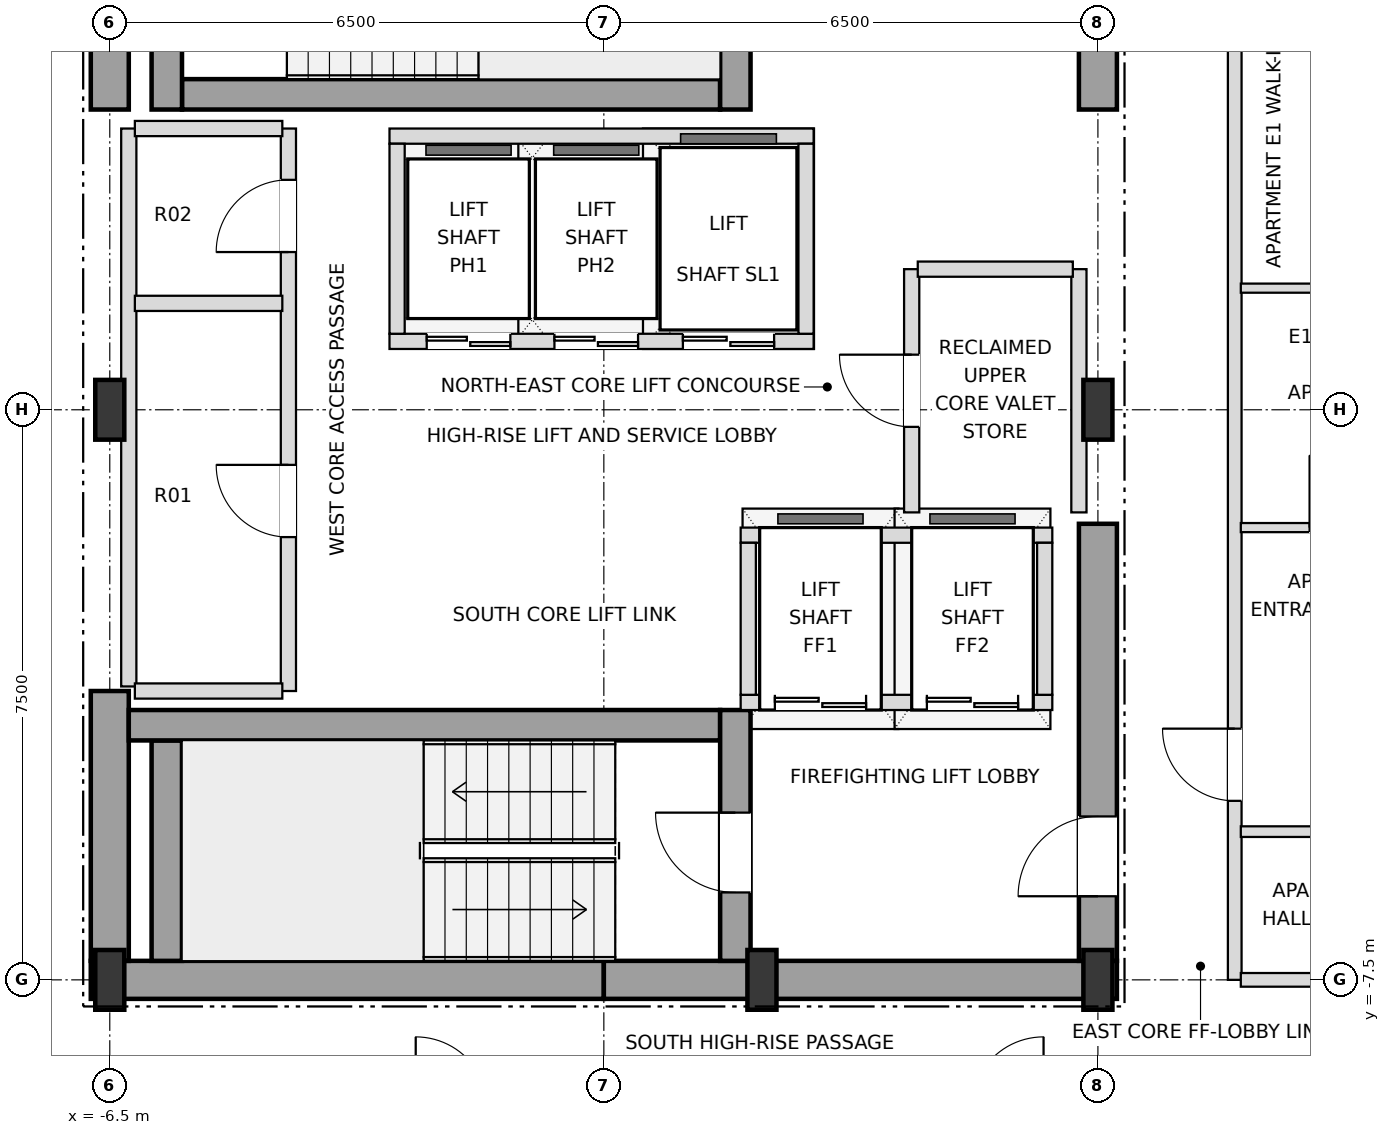
"""IFC4 building model, lengths in metres.
Left out: names, types, materials, properties, quantities, classifications, styles, units other than length and angle.
Written with IfcOpenShell. Run it as: python <this file> out.ifc"""

import sys

from ifc_helpers import new_model, si_unit, direction, frame, frame_2d, origin, origin_2d, place, context, subcontext, project, spatial, rectangle, i_section, extrude, element, fill, save


model = new_model("IFC4")
c1 = context("Model", 3, precision=1e-05, world=origin(), true_north=direction((0.0, 1.0)))
c2 = subcontext(c1, "Body", "Model", "MODEL_VIEW")
j1 = project(units=[si_unit("LENGTHUNIT", "METRE"), si_unit("PLANEANGLEUNIT", "RADIAN")], contexts=[c1])
p1 = place(None, origin())
s1 = spatial("IfcSite", under=j1, at=p1, CompositionType="ELEMENT")
p2 = place(p1, origin())
s2 = spatial("IfcBuilding", under=s1, at=p2, CompositionType="ELEMENT")
p3 = place(p2, frame((0.0, 0.0, 236.7)))
s3 = spatial("IfcBuildingStorey", under=s2, at=p3, CompositionType="ELEMENT", Elevation=236.7)
for number, where, z_axis, x_axis in (
    (1, (-6.5, -7.5, 0.0), (0.0, 0.0, 1.0), (1.0, 0.0, 0.0)),
    (2, (2.08, -7.5, 0.0), (0.0, 0.0, 1.0), (1.0, 0.0, 0.0)),
    (3, (6.5, -7.5, 0.0), (0.0, 0.0, 1.0), (1.0, 0.0, 0.0)),
    (4, (-6.5, 0.0, 0.0), (0.0, 0.0, 1.0), (1.0, 0.0, 0.0)),
    (5, (6.5, 0.0, 0.0), (0.0, 0.0, 1.0), (1.0, 0.0, 0.0)),
):
    element("IfcColumn", number, at=place(p3, frame(where, z_axis=z_axis, x_axis=x_axis)), inside=s3, PredefinedType="COLUMN", context=c2, shape_type="SweptSolid", body=[
        extrude(i_section(OverallWidth=0.382, OverallDepth=0.786, WebThickness=0.02, FlangeThickness=0.033, at=origin_2d()), origin(), (0.0, 0.0, 1.0), 3.6),
    ])
for number, where, z_axis, x_axis in (
    (6, (-6.75, -7.5, 0.0), (0.0, 0.0, 1.0), (1.0, 0.0, 0.0)),
    (7, (0.0, -7.5, 0.0), (0.0, 0.0, 1.0), (1.0, 0.0, 0.0)),
):
    element("IfcWall", number, at=place(p3, frame(where, z_axis=z_axis, x_axis=x_axis)), inside=s3, PredefinedType="SHEAR", context=c2, shape_type="SweptSolid", body=[
        extrude(rectangle(XDim=6.75, YDim=0.5, at=frame_2d((3.375, 0.0))), origin(), (0.0, 0.0, 1.0), 3.38),
    ])
p4 = place(p3, frame((-6.5, -7.25, 0.0), z_axis=(0.0, 0.0, 1.0), x_axis=(0.0, 1.0, 0.0)))
e8 = element("IfcWall", 8, at=p4, inside=s3, PredefinedType="SHEAR", context=c2, shape_type="SweptSolid", body=[
    extrude(rectangle(XDim=3.55, YDim=0.5, at=frame_2d((1.775, 0.0))), origin(), (0.0, 0.0, 1.0), 3.38),
])
p5 = place(p3, frame((-6.5, 3.95, 0.0), z_axis=(0.0, 0.0, 1.0), x_axis=(0.0, 1.0, 0.0)))
e9 = element("IfcWall", 9, at=p5, inside=s3, PredefinedType="SHEAR", context=c2, shape_type="SweptSolid", body=[
    extrude(rectangle(XDim=3.3, YDim=0.5, at=frame_2d((1.65, 0.0))), origin(), (0.0, 0.0, 1.0), 3.38),
])
p6 = place(p3, frame((6.5, -7.25, 0.0), z_axis=(0.0, 0.0, 1.0), x_axis=(0.0, 1.0, 0.0)))
e10 = element("IfcWall", 10, at=p6, inside=s3, PredefinedType="SHEAR", context=c2, shape_type="SweptSolid", body=[
    extrude(rectangle(XDim=5.75, YDim=0.5, at=frame_2d((2.875, 0.0))), origin(), (0.0, 0.0, 1.0), 3.38),
])
p7 = place(p6, frame((0.85, 0.0, 0.0)))
e11 = element("IfcOpeningElement", 11, at=p7, cuts=e10, PredefinedType="OPENING", context=c2, shape_type="SweptSolid", body=[
    extrude(rectangle(XDim=1.05, YDim=2.15, at=frame_2d((0.525, 1.075))), frame((0.0, 0.26, 0.0), z_axis=(0.0, -1.0, 0.0), x_axis=(1.0, 0.0, 0.0)), (0.0, 0.0, 1.0), 0.52),
])
p8 = place(p3, frame((6.5, 3.95, 0.0), z_axis=(0.0, 0.0, 1.0), x_axis=(0.0, 1.0, 0.0)))
e12 = element("IfcWall", 12, at=p8, inside=s3, PredefinedType="SHEAR", context=c2, shape_type="SweptSolid", body=[
    extrude(rectangle(XDim=3.3, YDim=0.5, at=frame_2d((1.65, 0.0))), origin(), (0.0, 0.0, 1.0), 3.38),
])
p9 = place(p3, frame((-5.75, -7.25, 0.0), z_axis=(0.0, 0.0, 1.0), x_axis=(0.0, 1.0, 0.0)))
e13 = element("IfcWall", 13, at=p9, inside=s3, PredefinedType="SHEAR", context=c2, shape_type="SweptSolid", body=[
    extrude(rectangle(XDim=2.9, YDim=0.4, at=frame_2d((1.45, 0.0))), origin(), (0.0, 0.0, 1.0), 3.38),
])
p10 = place(p3, frame((-6.25, -4.15, 0.0), z_axis=(0.0, 0.0, 1.0), x_axis=(1.0, 0.0, 0.0)))
e14 = element("IfcWall", 14, at=p10, inside=s3, PredefinedType="SHEAR", context=c2, shape_type="SweptSolid", body=[
    extrude(rectangle(XDim=7.78, YDim=0.4, at=frame_2d((3.89, 0.0))), origin(), (0.0, 0.0, 1.0), 3.38),
])
p11 = place(p3, frame((1.73, -7.25, 0.0), z_axis=(0.0, 0.0, 1.0), x_axis=(0.0, 1.0, 0.0)))
e15 = element("IfcWall", 15, at=p11, inside=s3, PredefinedType="SHEAR", context=c2, shape_type="SweptSolid", body=[
    extrude(rectangle(XDim=3.3, YDim=0.4, at=frame_2d((1.65, 0.0))), origin(), (0.0, 0.0, 1.0), 3.38),
])
p12 = place(p11, frame((0.9, 0.0, 0.0)))
e16 = element("IfcOpeningElement", 16, at=p12, cuts=e15, PredefinedType="OPENING", context=c2, shape_type="SweptSolid", body=[
    extrude(rectangle(XDim=1.05, YDim=2.15, at=frame_2d((0.525, 1.075))), frame((0.0, 0.21, 0.0), z_axis=(0.0, -1.0, 0.0), x_axis=(1.0, 0.0, 0.0)), (0.0, 0.0, 1.0), 0.42),
])
p13 = place(p3, frame((-5.55, 4.15, 0.0), z_axis=(0.0, 0.0, 1.0), x_axis=(1.0, 0.0, 0.0)))
e17 = element("IfcWall", 17, at=p13, inside=s3, PredefinedType="SHEAR", context=c2, shape_type="SweptSolid", body=[
    extrude(rectangle(XDim=7.08, YDim=0.4, at=frame_2d((3.54, 0.0))), origin(), (0.0, 0.0, 1.0), 3.38),
])
for number, where, z_axis, x_axis in (
    (18, (1.73, 3.95, 0.0), (0.0, 0.0, 1.0), (0.0, 1.0, 0.0)),
    (19, (-5.75, 3.95, 0.0), (0.0, 0.0, 1.0), (0.0, 1.0, 0.0)),
):
    element("IfcWall", number, at=place(p3, frame(where, z_axis=z_axis, x_axis=x_axis)), inside=s3, PredefinedType="SHEAR", context=c2, shape_type="SweptSolid", body=[
        extrude(rectangle(XDim=3.3, YDim=0.4, at=frame_2d((1.65, 0.0))), origin(), (0.0, 0.0, 1.0), 3.38),
    ])
p14 = place(p3, frame((-2.82, 0.9, 0.0), z_axis=(0.0, 0.0, 1.0), x_axis=(1.0, 0.0, 0.0)))
e20 = element("IfcWall", 20, at=p14, inside=s3, PredefinedType="SOLIDWALL", context=c2, shape_type="SweptSolid", body=[
    extrude(rectangle(XDim=5.58, YDim=0.2, at=frame_2d((2.79, 0.0))), origin(), (0.0, 0.0, 1.0), 3.38),
])
p15 = place(p14, frame((0.49, 0.0, 0.0)))
e21 = element("IfcOpeningElement", 21, at=p15, cuts=e20, PredefinedType="OPENING", context=c2, shape_type="SweptSolid", body=[
    extrude(rectangle(XDim=1.1, YDim=2.15, at=frame_2d((0.55, 1.075))), frame((0.0, 0.11, 0.0), z_axis=(0.0, -1.0, 0.0), x_axis=(1.0, 0.0, 0.0)), (0.0, 0.0, 1.0), 0.22),
])
p16 = place(p14, frame((2.17, 0.0, 0.0)))
e22 = element("IfcOpeningElement", 22, at=p16, cuts=e20, PredefinedType="OPENING", context=c2, shape_type="SweptSolid", body=[
    extrude(rectangle(XDim=1.1, YDim=2.15, at=frame_2d((0.55, 1.075))), frame((0.0, 0.11, 0.0), z_axis=(0.0, -1.0, 0.0), x_axis=(1.0, 0.0, 0.0)), (0.0, 0.0, 1.0), 0.22),
])
p17 = place(p14, frame((3.86, 0.0, 0.0)))
e23 = element("IfcOpeningElement", 23, at=p17, cuts=e20, PredefinedType="OPENING", context=c2, shape_type="SweptSolid", body=[
    extrude(rectangle(XDim=1.2, YDim=2.2, at=frame_2d((0.6, 1.1))), frame((0.0, 0.11, 0.0), z_axis=(0.0, -1.0, 0.0), x_axis=(1.0, 0.0, 0.0)), (0.0, 0.0, 1.0), 0.22),
])
p18 = place(p3, frame((-2.82, 3.6, 0.0), z_axis=(0.0, 0.0, 1.0), x_axis=(1.0, 0.0, 0.0)))
e24 = element("IfcWall", 24, at=p18, inside=s3, PredefinedType="SOLIDWALL", context=c2, shape_type="SweptSolid", body=[
    extrude(rectangle(XDim=5.58, YDim=0.2, at=frame_2d((2.79, 0.0))), origin(), (0.0, 0.0, 1.0), 3.38),
])
for number, where, z_axis, x_axis in (
    (25, (-2.72, 1.0, 0.0), (0.0, 0.0, 1.0), (0.0, 1.0, 0.0)),
    (26, (2.66, 1.0, 0.0), (0.0, 0.0, 1.0), (0.0, 1.0, 0.0)),
):
    element("IfcWall", number, at=place(p3, frame(where, z_axis=z_axis, x_axis=x_axis)), inside=s3, PredefinedType="SOLIDWALL", context=c2, shape_type="SweptSolid", body=[
        extrude(rectangle(XDim=2.5, YDim=0.2, at=frame_2d((1.25, 0.0))), origin(), (0.0, 0.0, 1.0), 3.38),
    ])
p19 = place(p3, frame((1.8, -3.85, 0.0), z_axis=(0.0, 0.0, 1.0), x_axis=(1.0, 0.0, 0.0)))
e27 = element("IfcWall", 27, at=p19, inside=s3, PredefinedType="SOLIDWALL", context=c2, shape_type="SweptSolid", body=[
    extrude(rectangle(XDim=4.1, YDim=0.2, at=frame_2d((2.05, 0.0))), origin(), (0.0, 0.0, 1.0), 3.38),
])
p20 = place(p19, frame((0.45, 0.0, 0.0)))
e28 = element("IfcOpeningElement", 28, at=p20, cuts=e27, PredefinedType="OPENING", context=c2, shape_type="SweptSolid", body=[
    extrude(rectangle(XDim=1.2, YDim=2.2, at=frame_2d((0.6, 1.1))), frame((0.0, 0.11, 0.0), z_axis=(0.0, -1.0, 0.0), x_axis=(1.0, 0.0, 0.0)), (0.0, 0.0, 1.0), 0.22),
])
p21 = place(p19, frame((2.45, 0.0, 0.0)))
e29 = element("IfcOpeningElement", 29, at=p21, cuts=e27, PredefinedType="OPENING", context=c2, shape_type="SweptSolid", body=[
    extrude(rectangle(XDim=1.2, YDim=2.2, at=frame_2d((0.6, 1.1))), frame((0.0, 0.11, 0.0), z_axis=(0.0, -1.0, 0.0), x_axis=(1.0, 0.0, 0.0)), (0.0, 0.0, 1.0), 0.22),
])
p22 = place(p3, frame((1.8, -1.65, 0.0), z_axis=(0.0, 0.0, 1.0), x_axis=(1.0, 0.0, 0.0)))
e30 = element("IfcWall", 30, at=p22, inside=s3, PredefinedType="SOLIDWALL", context=c2, shape_type="SweptSolid", body=[
    extrude(rectangle(XDim=4.1, YDim=0.2, at=frame_2d((2.05, 0.0))), origin(), (0.0, 0.0, 1.0), 3.38),
])
for number, where, z_axis, x_axis in (
    (31, (1.9, -3.75, 0.0), (0.0, 0.0, 1.0), (0.0, 1.0, 0.0)),
    (32, (5.8, -3.75, 0.0), (0.0, 0.0, 1.0), (0.0, 1.0, 0.0)),
):
    element("IfcWall", number, at=place(p3, frame(where, z_axis=z_axis, x_axis=x_axis)), inside=s3, PredefinedType="SOLIDWALL", context=c2, shape_type="SweptSolid", body=[
        extrude(rectangle(XDim=2.0, YDim=0.2, at=frame_2d((1.0, 0.0))), origin(), (0.0, 0.0, 1.0), 3.38),
    ])
p23 = place(p3, frame((-6.25, -3.64, 0.0), z_axis=(0.0, 0.0, 1.0), x_axis=(0.0, 1.0, 0.0)))
e33 = element("IfcWall", 33, at=p23, inside=s3, PredefinedType="SOLIDWALL", context=c2, shape_type="SweptSolid", body=[
    extrude(rectangle(XDim=7.34, YDim=0.2, at=frame_2d((3.67, 0.0))), origin(), (0.0, 0.0, 1.0), 3.38),
])
p24 = place(p3, frame((-4.15, -3.7, 0.0), z_axis=(0.0, 0.0, 1.0), x_axis=(0.0, 1.0, 0.0)))
e34 = element("IfcWall", 34, at=p24, inside=s3, PredefinedType="SOLIDWALL", context=c2, shape_type="SweptSolid", body=[
    extrude(rectangle(XDim=7.4, YDim=0.2, at=frame_2d((3.7, 0.0))), origin(), (0.0, 0.0, 1.0), 3.38),
])
p25 = place(p24, frame((2.025, 0.0, 0.0)))
e35 = element("IfcOpeningElement", 35, at=p25, cuts=e34, PredefinedType="OPENING", context=c2, shape_type="SweptSolid", body=[
    extrude(rectangle(XDim=0.95, YDim=2.15, at=frame_2d((0.475, 1.075))), frame((0.0, 0.11, 0.0), z_axis=(0.0, -1.0, 0.0), x_axis=(1.0, 0.0, 0.0)), (0.0, 0.0, 1.0), 0.22),
])
p26 = place(p24, frame((5.775, 0.0, 0.0)))
e36 = element("IfcOpeningElement", 36, at=p26, cuts=e34, PredefinedType="OPENING", context=c2, shape_type="SweptSolid", body=[
    extrude(rectangle(XDim=0.95, YDim=2.15, at=frame_2d((0.475, 1.075))), frame((0.0, 0.11, 0.0), z_axis=(0.0, -1.0, 0.0), x_axis=(1.0, 0.0, 0.0)), (0.0, 0.0, 1.0), 0.22),
])
p27 = place(p3, frame((4.05, -1.35, 0.0), z_axis=(0.0, 0.0, 1.0), x_axis=(0.0, 1.0, 0.0)))
e37 = element("IfcWall", 37, at=p27, inside=s3, PredefinedType="SOLIDWALL", context=c2, shape_type="SweptSolid", body=[
    extrude(rectangle(XDim=3.2, YDim=0.2, at=frame_2d((1.6, 0.0))), origin(), (0.0, 0.0, 1.0), 3.38),
])
p28 = place(p27, frame((1.125, 0.0, 0.0)))
e38 = element("IfcOpeningElement", 38, at=p28, cuts=e37, PredefinedType="OPENING", context=c2, shape_type="SweptSolid", body=[
    extrude(rectangle(XDim=0.95, YDim=2.15, at=frame_2d((0.475, 1.075))), frame((0.0, 0.11, 0.0), z_axis=(0.0, -1.0, 0.0), x_axis=(1.0, 0.0, 0.0)), (0.0, 0.0, 1.0), 0.22),
])
p29 = place(p3, frame((6.25, -1.35, 0.0), z_axis=(0.0, 0.0, 1.0), x_axis=(0.0, 1.0, 0.0)))
e39 = element("IfcWall", 39, at=p29, inside=s3, PredefinedType="SOLIDWALL", context=c2, shape_type="SweptSolid", body=[
    extrude(rectangle(XDim=3.2, YDim=0.2, at=frame_2d((1.6, 0.0))), origin(), (0.0, 0.0, 1.0), 3.38),
])
p30 = place(p3, frame((8.3, -7.5, 0.0), z_axis=(0.0, 0.0, 1.0), x_axis=(0.0, 1.0, 0.0)))
e40 = element("IfcWall", 40, at=p30, inside=s3, PredefinedType="PARTITIONING", context=c2, shape_type="SweptSolid", body=[
    extrude(rectangle(XDim=15.0, YDim=0.18, at=frame_2d((7.5, 0.0))), origin(), (0.0, 0.0, 1.0), 3.38),
])
p31 = place(p30, frame((2.355, 0.0, 0.0)))
e41 = element("IfcOpeningElement", 41, at=p31, cuts=e40, PredefinedType="OPENING", context=c2, shape_type="SweptSolid", body=[
    extrude(rectangle(XDim=0.95, YDim=2.15, at=frame_2d((0.475, 1.075))), frame((0.0, 0.1, 0.0), z_axis=(0.0, -1.0, 0.0), x_axis=(1.0, 0.0, 0.0)), (0.0, 0.0, 1.0), 0.2),
])
p32 = place(p3, frame((8.38, -7.5, 0.0), z_axis=(0.0, 0.0, 1.0), x_axis=(1.0, 0.0, 0.0)))
e42 = element("IfcWall", 42, at=p32, inside=s3, PredefinedType="PARTITIONING", context=c2, shape_type="SweptSolid", body=[
    extrude(rectangle(XDim=2.74, YDim=0.18, at=frame_2d((1.37, 0.0))), origin(), (0.0, 0.0, 1.0), 2.826),
])
p33 = place(p3, frame((8.38, -5.55, 0.0), z_axis=(0.0, 0.0, 1.0), x_axis=(1.0, 0.0, 0.0)))
e43 = element("IfcWall", 43, at=p33, inside=s3, PredefinedType="PARTITIONING", context=c2, shape_type="SweptSolid", body=[
    extrude(rectangle(XDim=2.74, YDim=0.14, at=frame_2d((1.37, 0.0))), origin(), (0.0, 0.0, 1.0), 3.38),
])
p34 = place(p33, frame((0.93, 0.0, 0.0)))
e44 = element("IfcOpeningElement", 44, at=p34, cuts=e43, PredefinedType="OPENING", context=c2, shape_type="SweptSolid", body=[
    extrude(rectangle(XDim=0.9, YDim=2.1, at=frame_2d((0.45, 1.05))), frame((0.0, 0.08, 0.0), z_axis=(0.0, -1.0, 0.0), x_axis=(1.0, 0.0, 0.0)), (0.0, 0.0, 1.0), 0.16),
])
p35 = place(p3, frame((-6.17, -3.7, 0.0), z_axis=(0.0, 0.0, 1.0), x_axis=(1.0, 0.0, 0.0)))
e45 = element("IfcWall", 45, at=p35, inside=s3, PredefinedType="SOLIDWALL", context=c2, shape_type="SweptSolid", body=[
    extrude(rectangle(XDim=1.94, YDim=0.2, at=frame_2d((0.97, 0.0))), origin(), (0.0, 0.0, 1.0), 3.38),
])
p36 = place(p3, frame((8.38, -1.55, 0.0), z_axis=(0.0, 0.0, 1.0), x_axis=(1.0, 0.0, 0.0)))
e46 = element("IfcWall", 46, at=p36, inside=s3, PredefinedType="PARTITIONING", context=c2, shape_type="SweptSolid", body=[
    extrude(rectangle(XDim=2.74, YDim=0.12, at=frame_2d((1.37, 0.0))), origin(), (0.0, 0.0, 1.0), 3.38),
])
p37 = place(p36, frame((0.905, 0.0, 0.0)))
e47 = element("IfcOpeningElement", 47, at=p37, cuts=e46, PredefinedType="OPENING", context=c2, shape_type="SweptSolid", body=[
    extrude(rectangle(XDim=0.95, YDim=2.1, at=frame_2d((0.475, 1.05))), frame((0.0, 0.07, 0.0), z_axis=(0.0, -1.0, 0.0), x_axis=(1.0, 0.0, 0.0)), (0.0, 0.0, 1.0), 0.14),
])
p38 = place(p3, frame((-6.17, 1.4, 0.0), z_axis=(0.0, 0.0, 1.0), x_axis=(1.0, 0.0, 0.0)))
e48 = element("IfcWall", 48, at=p38, inside=s3, PredefinedType="SOLIDWALL", context=c2, shape_type="SweptSolid", body=[
    extrude(rectangle(XDim=1.94, YDim=0.2, at=frame_2d((0.97, 0.0))), origin(), (0.0, 0.0, 1.0), 3.38),
])
p39 = place(p3, frame((8.38, 1.6, 0.0), z_axis=(0.0, 0.0, 1.0), x_axis=(1.0, 0.0, 0.0)))
e49 = element("IfcWall", 49, at=p39, inside=s3, PredefinedType="PARTITIONING", context=c2, shape_type="SweptSolid", body=[
    extrude(rectangle(XDim=2.74, YDim=0.12, at=frame_2d((1.37, 0.0))), origin(), (0.0, 0.0, 1.0), 3.38),
])
p40 = place(p39, frame((0.93, 0.0, 0.0)))
e50 = element("IfcOpeningElement", 50, at=p40, cuts=e49, PredefinedType="OPENING", context=c2, shape_type="SweptSolid", body=[
    extrude(rectangle(XDim=0.9, YDim=2.1, at=frame_2d((0.45, 1.05))), frame((0.0, 0.07, 0.0), z_axis=(0.0, -1.0, 0.0), x_axis=(1.0, 0.0, 0.0)), (0.0, 0.0, 1.0), 0.14),
])
p41 = place(p3, frame((4.13, 1.85, 0.0), z_axis=(0.0, 0.0, 1.0), x_axis=(1.0, 0.0, 0.0)))
e51 = element("IfcWall", 51, at=p41, inside=s3, PredefinedType="SOLIDWALL", context=c2, shape_type="SweptSolid", body=[
    extrude(rectangle(XDim=2.04, YDim=0.2, at=frame_2d((1.02, 0.0))), origin(), (0.0, 0.0, 1.0), 3.38),
])
p42 = place(p3, frame((-6.17, 3.7, 0.0), z_axis=(0.0, 0.0, 1.0), x_axis=(1.0, 0.0, 0.0)))
e52 = element("IfcWall", 52, at=p42, inside=s3, PredefinedType="SOLIDWALL", context=c2, shape_type="SweptSolid", body=[
    extrude(rectangle(XDim=1.94, YDim=0.2, at=frame_2d((0.97, 0.0))), origin(), (0.0, 0.0, 1.0), 3.38),
])
p43 = place(p7, origin())
e53 = element("IfcDoor", 53, at=p43, inside=s3, OperationType="SINGLE_SWING_LEFT", PredefinedType="DOOR", context=c2, shape_type="SweptSolid", body=[
    extrude(rectangle(XDim=1.05, YDim=2.15, at=frame_2d((0.525, 1.075))), frame((0.0, 0.025, 0.0), z_axis=(0.0, -1.0, 0.0), x_axis=(1.0, 0.0, 0.0)), (0.0, 0.0, 1.0), 0.05),
])
fill(e11, e53)
p44 = place(p12, origin())
e54 = element("IfcDoor", 54, at=p44, inside=s3, OperationType="SINGLE_SWING_RIGHT", PredefinedType="DOOR", context=c2, shape_type="SweptSolid", body=[
    extrude(rectangle(XDim=1.05, YDim=2.15, at=frame_2d((0.525, 1.075))), frame((0.0, 0.025, 0.0), z_axis=(0.0, -1.0, 0.0), x_axis=(1.0, 0.0, 0.0)), (0.0, 0.0, 1.0), 0.05),
])
fill(e16, e54)
p45 = place(p15, origin())
e55 = element("IfcDoor", 55, at=p45, inside=s3, OperationType="DOUBLE_DOOR_SLIDING", PredefinedType="DOOR", context=c2, shape_type="SweptSolid", body=[
    extrude(rectangle(XDim=1.1, YDim=2.15, at=frame_2d((0.55, 1.075))), frame((0.0, 0.025, 0.0), z_axis=(0.0, -1.0, 0.0), x_axis=(1.0, 0.0, 0.0)), (0.0, 0.0, 1.0), 0.05),
])
fill(e21, e55)
p46 = place(p16, origin())
e56 = element("IfcDoor", 56, at=p46, inside=s3, OperationType="DOUBLE_DOOR_SLIDING", PredefinedType="DOOR", context=c2, shape_type="SweptSolid", body=[
    extrude(rectangle(XDim=1.1, YDim=2.15, at=frame_2d((0.55, 1.075))), frame((0.0, 0.025, 0.0), z_axis=(0.0, -1.0, 0.0), x_axis=(1.0, 0.0, 0.0)), (0.0, 0.0, 1.0), 0.05),
])
fill(e22, e56)
p47 = place(p17, origin())
e57 = element("IfcDoor", 57, at=p47, inside=s3, OperationType="DOUBLE_DOOR_SLIDING", PredefinedType="DOOR", context=c2, shape_type="SweptSolid", body=[
    extrude(rectangle(XDim=1.2, YDim=2.2, at=frame_2d((0.6, 1.1))), frame((0.0, 0.025, 0.0), z_axis=(0.0, -1.0, 0.0), x_axis=(1.0, 0.0, 0.0)), (0.0, 0.0, 1.0), 0.05),
])
fill(e23, e57)
p48 = place(p20, origin())
e58 = element("IfcDoor", 58, at=p48, inside=s3, OperationType="DOUBLE_DOOR_SLIDING", PredefinedType="DOOR", context=c2, shape_type="SweptSolid", body=[
    extrude(rectangle(XDim=1.2, YDim=2.2, at=frame_2d((0.6, 1.1))), frame((0.0, 0.025, 0.0), z_axis=(0.0, -1.0, 0.0), x_axis=(1.0, 0.0, 0.0)), (0.0, 0.0, 1.0), 0.05),
])
fill(e28, e58)
p49 = place(p21, origin())
e59 = element("IfcDoor", 59, at=p49, inside=s3, OperationType="DOUBLE_DOOR_SLIDING", PredefinedType="DOOR", context=c2, shape_type="SweptSolid", body=[
    extrude(rectangle(XDim=1.2, YDim=2.2, at=frame_2d((0.6, 1.1))), frame((0.0, 0.025, 0.0), z_axis=(0.0, -1.0, 0.0), x_axis=(1.0, 0.0, 0.0)), (0.0, 0.0, 1.0), 0.05),
])
fill(e29, e59)
p50 = place(p25, origin())
e60 = element("IfcDoor", 60, at=p50, inside=s3, OperationType="SINGLE_SWING_RIGHT", PredefinedType="DOOR", context=c2, shape_type="SweptSolid", body=[
    extrude(rectangle(XDim=0.95, YDim=2.15, at=frame_2d((0.475, 1.075))), frame((0.0, 0.025, 0.0), z_axis=(0.0, -1.0, 0.0), x_axis=(1.0, 0.0, 0.0)), (0.0, 0.0, 1.0), 0.05),
])
fill(e35, e60)
p51 = place(p26, origin())
e61 = element("IfcDoor", 61, at=p51, inside=s3, OperationType="SINGLE_SWING_LEFT", PredefinedType="DOOR", context=c2, shape_type="SweptSolid", body=[
    extrude(rectangle(XDim=0.95, YDim=2.15, at=frame_2d((0.475, 1.075))), frame((0.0, 0.025, 0.0), z_axis=(0.0, -1.0, 0.0), x_axis=(1.0, 0.0, 0.0)), (0.0, 0.0, 1.0), 0.05),
])
fill(e36, e61)
p52 = place(p28, origin())
e62 = element("IfcDoor", 62, at=p52, inside=s3, OperationType="SINGLE_SWING_RIGHT", PredefinedType="DOOR", context=c2, shape_type="SweptSolid", body=[
    extrude(rectangle(XDim=0.95, YDim=2.15, at=frame_2d((0.475, 1.075))), frame((0.0, 0.025, 0.0), z_axis=(0.0, -1.0, 0.0), x_axis=(1.0, 0.0, 0.0)), (0.0, 0.0, 1.0), 0.05),
])
fill(e38, e62)
p53 = place(p31, origin())
e63 = element("IfcDoor", 63, at=p53, inside=s3, OperationType="SINGLE_SWING_RIGHT", PredefinedType="DOOR", context=c2, shape_type="SweptSolid", body=[
    extrude(rectangle(XDim=0.95, YDim=2.15, at=frame_2d((0.475, 1.075))), frame((0.0, 0.025, 0.0), z_axis=(0.0, -1.0, 0.0), x_axis=(1.0, 0.0, 0.0)), (0.0, 0.0, 1.0), 0.05),
])
fill(e41, e63)
p54 = place(p37, origin())
e64 = element("IfcDoor", 64, at=p54, inside=s3, OperationType="SINGLE_SWING_LEFT", PredefinedType="DOOR", context=c2, shape_type="SweptSolid", body=[
    extrude(rectangle(XDim=0.95, YDim=2.1, at=frame_2d((0.475, 1.05))), frame((0.0, 0.025, 0.0), z_axis=(0.0, -1.0, 0.0), x_axis=(1.0, 0.0, 0.0)), (0.0, 0.0, 1.0), 0.05),
])
fill(e47, e64)
save(model, sys.argv[1])
